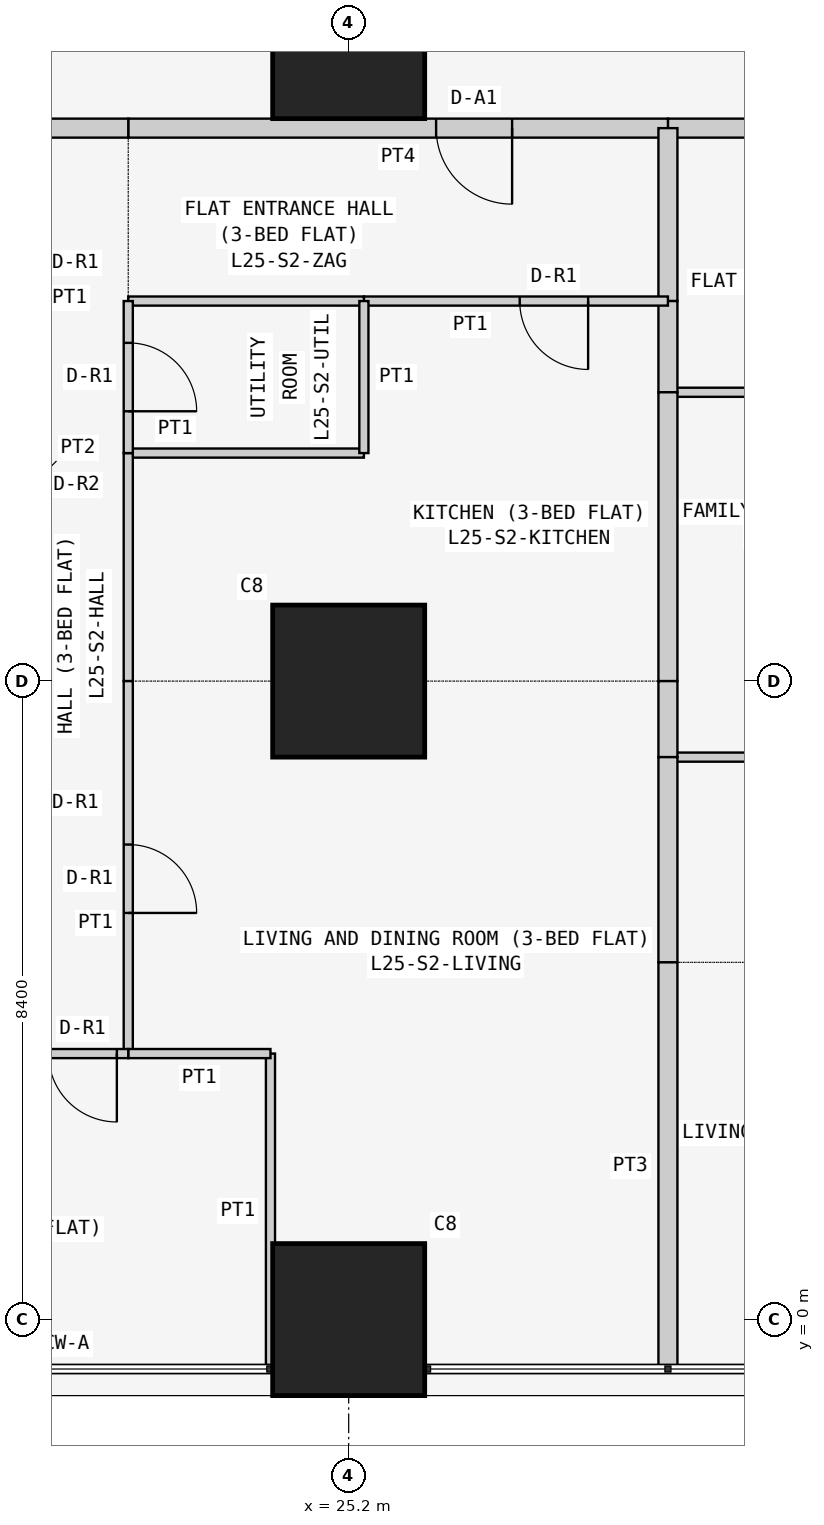
"""IFC4 building model, lengths in metres.
Left out: names, types, materials, properties, quantities, classifications, styles, units other than length and angle.
Written with IfcOpenShell. Run it as: python <this file> out.ifc"""

import sys

from ifc_helpers import new_model, si_unit, direction, frame, frame_2d, origin, origin_2d, place, context, subcontext, project, spatial, rectangle, extrude, element, fill, save


model = new_model("IFC4")
c1 = context("Model", 3, precision=1e-05, world=origin(), true_north=direction((0.0, 1.0)))
c2 = subcontext(c1, "Body", "Model", "MODEL_VIEW")
j1 = project(units=[si_unit("LENGTHUNIT", "METRE"), si_unit("PLANEANGLEUNIT", "RADIAN")], contexts=[c1])
p1 = place(None, origin())
s1 = spatial("IfcSite", under=j1, at=p1, CompositionType="ELEMENT")
p2 = place(p1, origin())
s2 = spatial("IfcBuilding", under=s1, at=p2, CompositionType="ELEMENT")
p3 = place(p2, frame((0.0, 0.0, 99.3)))
s3 = spatial("IfcBuildingStorey", under=s2, at=p3, CompositionType="ELEMENT", Elevation=99.3)
for number, where, z_axis, x_axis in (
    (1, (25.2, 0.0, 0.0), (0.0, 0.0, 1.0), (1.0, 0.0, 0.0)),
    (2, (25.2, 8.4, 0.0), (0.0, 0.0, 1.0), (1.0, 0.0, 0.0)),
    (3, (25.2, 16.8, 0.0), (0.0, 0.0, 1.0), (1.0, 0.0, 0.0)),
):
    element("IfcColumn", number, at=place(p3, frame(where, z_axis=z_axis, x_axis=x_axis)), inside=s3, PredefinedType="COLUMN", context=c2, shape_type="SweptSolid", body=[
        extrude(rectangle(XDim=2.0, YDim=2.0, at=origin_2d()), origin(), (0.0, 0.0, 1.0), 3.6),
    ])
p4 = place(p3, frame((34.629, 15.675, 0.0), z_axis=(0.0, 0.0, 1.0), x_axis=(-1.0, 0.0, 0.0)))
e4 = element("IfcWall", 4, at=p4, inside=s3, PredefinedType="PARTITIONING", context=c2, shape_type="SweptSolid", body=[
    extrude(rectangle(XDim=5.229, YDim=0.25, at=frame_2d((2.615, 0.0))), origin(), (0.0, 0.0, 1.0), 3.35),
])
p5 = place(p4, frame((2.229, 0.0, 0.0)))
e5 = element("IfcOpeningElement", 5, at=p5, cuts=e4, PredefinedType="OPENING", context=c2, shape_type="SweptSolid", body=[
    extrude(rectangle(XDim=1.0, YDim=2.1, at=frame_2d((0.5, 1.05))), frame((0.0, 0.135, 0.0), z_axis=(0.0, -1.0, 0.0), x_axis=(1.0, 0.0, 0.0)), (0.0, 0.0, 1.0), 0.27),
])
p6 = place(p3, frame((29.4, 15.675, 0.0), z_axis=(0.0, 0.0, 1.0), x_axis=(-1.0, 0.0, 0.0)))
e6 = element("IfcWall", 6, at=p6, inside=s3, PredefinedType="PARTITIONING", context=c2, shape_type="SweptSolid", body=[
    extrude(rectangle(XDim=7.1, YDim=0.25, at=frame_2d((3.55, 0.0))), origin(), (0.0, 0.0, 1.0), 3.35),
])
p7 = place(p6, frame((2.05, 0.0, 0.0)))
e7 = element("IfcOpeningElement", 7, at=p7, cuts=e6, PredefinedType="OPENING", context=c2, shape_type="SweptSolid", body=[
    extrude(rectangle(XDim=1.0, YDim=2.1, at=frame_2d((0.5, 1.05))), frame((0.0, 0.135, 0.0), z_axis=(0.0, -1.0, 0.0), x_axis=(1.0, 0.0, 0.0)), (0.0, 0.0, 1.0), 0.27),
])
p8 = place(p3, frame((22.3, 15.675, 0.0), z_axis=(0.0, 0.0, 1.0), x_axis=(-1.0, 0.0, 0.0)))
e8 = element("IfcWall", 8, at=p8, inside=s3, PredefinedType="PARTITIONING", context=c2, shape_type="SweptSolid", body=[
    extrude(rectangle(XDim=1.2, YDim=0.25, at=frame_2d((0.6, 0.0))), origin(), (0.0, 0.0, 1.0), 3.35),
])
p9 = place(p3, frame((29.4, 12.2, 0.0), z_axis=(0.0, 0.0, 1.0), x_axis=(1.0, 0.0, 0.0)))
e9 = element("IfcWall", 9, at=p9, inside=s3, PredefinedType="PARTITIONING", context=c2, shape_type="SweptSolid", body=[
    extrude(rectangle(XDim=5.229, YDim=0.12, at=frame_2d((2.615, 0.0))), origin(), (0.0, 0.0, 1.0), 3.35),
])
p10 = place(p3, frame((29.4, 15.675, 0.0), z_axis=(0.0, 0.0, 1.0), x_axis=(0.0, -1.0, 0.0)))
e10 = element("IfcWall", 10, at=p10, inside=s3, PredefinedType="PARTITIONING", context=c2, shape_type="SweptSolid", body=[
    extrude(rectangle(XDim=2.275, YDim=0.25, at=frame_2d((1.138, 0.0))), origin(), (0.0, 0.0, 1.0), 2.667),
])
p11 = place(p3, frame((29.4, 13.4, 0.0), z_axis=(0.0, 0.0, 1.0), x_axis=(0.0, -1.0, 0.0)))
e11 = element("IfcWall", 11, at=p11, inside=s3, PredefinedType="PARTITIONING", context=c2, shape_type="SweptSolid", body=[
    extrude(rectangle(XDim=1.2, YDim=0.25, at=frame_2d((0.6, 0.0))), origin(), (0.0, 0.0, 1.0), 2.667),
])
p12 = place(p3, frame((29.4, 7.4, 0.0), z_axis=(0.0, 0.0, 1.0), x_axis=(1.0, 0.0, 0.0)))
e12 = element("IfcWall", 12, at=p12, inside=s3, PredefinedType="PARTITIONING", context=c2, shape_type="SweptSolid", body=[
    extrude(rectangle(XDim=5.229, YDim=0.12, at=frame_2d((2.615, 0.0))), origin(), (0.0, 0.0, 1.0), 3.35),
])
p13 = place(p3, frame((29.4, 12.2, 0.0), z_axis=(0.0, 0.0, 1.0), x_axis=(0.0, -1.0, 0.0)))
e13 = element("IfcWall", 13, at=p13, inside=s3, PredefinedType="PARTITIONING", context=c2, shape_type="SweptSolid", body=[
    extrude(rectangle(XDim=3.8, YDim=0.25, at=frame_2d((1.9, 0.0))), origin(), (0.0, 0.0, 1.0), 2.667),
])
p14 = place(p3, frame((29.4, 8.4, 0.0), z_axis=(0.0, 0.0, 1.0), x_axis=(0.0, -1.0, 0.0)))
e14 = element("IfcWall", 14, at=p14, inside=s3, PredefinedType="PARTITIONING", context=c2, shape_type="SweptSolid", body=[
    extrude(rectangle(XDim=1.0, YDim=0.25, at=frame_2d((0.5, 0.0))), origin(), (0.0, 0.0, 1.0), 2.667),
])
p15 = place(p3, frame((29.4, 7.4, 0.0), z_axis=(0.0, 0.0, 1.0), x_axis=(0.0, -1.0, 0.0)))
e15 = element("IfcWall", 15, at=p15, inside=s3, PredefinedType="PARTITIONING", context=c2, shape_type="SweptSolid", body=[
    extrude(rectangle(XDim=2.7, YDim=0.25, at=frame_2d((1.35, 0.0))), origin(), (0.0, 0.0, 1.0), 2.667),
])
p16 = place(p3, frame((29.4, 4.7, 0.0), z_axis=(0.0, 0.0, 1.0), x_axis=(0.0, -1.0, 0.0)))
e16 = element("IfcWall", 16, at=p16, inside=s3, PredefinedType="PARTITIONING", context=c2, shape_type="SweptSolid", body=[
    extrude(rectangle(XDim=5.35, YDim=0.25, at=frame_2d((2.675, 0.0))), origin(), (0.0, 0.0, 1.0), 2.667),
])
p17 = place(p3, frame((29.4, 13.4, 0.0), z_axis=(0.0, 0.0, 1.0), x_axis=(-1.0, 0.0, 0.0)))
e17 = element("IfcWall", 17, at=p17, inside=s3, PredefinedType="PARTITIONING", context=c2, shape_type="SweptSolid", body=[
    extrude(rectangle(XDim=4.0, YDim=0.12, at=frame_2d((2.0, 0.0))), origin(), (0.0, 0.0, 1.0), 3.35),
])
p18 = place(p17, frame((1.05, 0.0, 0.0)))
e18 = element("IfcOpeningElement", 18, at=p18, cuts=e17, PredefinedType="OPENING", context=c2, shape_type="SweptSolid", body=[
    extrude(rectangle(XDim=0.9, YDim=2.1, at=frame_2d((0.45, 1.05))), frame((0.0, 0.07, 0.0), z_axis=(0.0, -1.0, 0.0), x_axis=(1.0, 0.0, 0.0)), (0.0, 0.0, 1.0), 0.14),
])
for number, where, z_axis, x_axis in (
    (19, (25.4, 13.4, 0.0), (0.0, 0.0, 1.0), (-1.0, 0.0, 0.0)),
    (20, (22.3, 11.4, 0.0), (0.0, 0.0, 1.0), (1.0, 0.0, 0.0)),
):
    element("IfcWall", number, at=place(p3, frame(where, z_axis=z_axis, x_axis=x_axis)), inside=s3, PredefinedType="PARTITIONING", context=c2, shape_type="SweptSolid", body=[
        extrude(rectangle(XDim=3.1, YDim=0.12, at=frame_2d((1.55, 0.0))), origin(), (0.0, 0.0, 1.0), 3.35),
    ])
p19 = place(p3, frame((25.4, 11.4, 0.0), z_axis=(0.0, 0.0, 1.0), x_axis=(0.0, 1.0, 0.0)))
e21 = element("IfcWall", 21, at=p19, inside=s3, PredefinedType="PARTITIONING", context=c2, shape_type="SweptSolid", body=[
    extrude(rectangle(XDim=2.0, YDim=0.12, at=frame_2d((1.0, 0.0))), origin(), (0.0, 0.0, 1.0), 3.35),
])
p20 = place(p3, frame((22.3, 8.4, 0.0), z_axis=(0.0, 0.0, 1.0), x_axis=(0.0, 1.0, 0.0)))
e22 = element("IfcWall", 22, at=p20, inside=s3, PredefinedType="PARTITIONING", context=c2, shape_type="SweptSolid", body=[
    extrude(rectangle(XDim=3.0, YDim=0.12, at=frame_2d((1.5, 0.0))), origin(), (0.0, 0.0, 1.0), 3.35),
])
p21 = place(p3, frame((22.3, 11.4, 0.0), z_axis=(0.0, 0.0, 1.0), x_axis=(0.0, 1.0, 0.0)))
e23 = element("IfcWall", 23, at=p21, inside=s3, PredefinedType="PARTITIONING", context=c2, shape_type="SweptSolid", body=[
    extrude(rectangle(XDim=2.0, YDim=0.12, at=frame_2d((1.0, 0.0))), origin(), (0.0, 0.0, 1.0), 3.35),
])
p22 = place(p21, frame((0.55, 0.0, 0.0)))
e24 = element("IfcOpeningElement", 24, at=p22, cuts=e23, PredefinedType="OPENING", context=c2, shape_type="SweptSolid", body=[
    extrude(rectangle(XDim=0.9, YDim=2.1, at=frame_2d((0.45, 1.05))), frame((0.0, 0.07, 0.0), z_axis=(0.0, -1.0, 0.0), x_axis=(1.0, 0.0, 0.0)), (0.0, 0.0, 1.0), 0.14),
])
p23 = place(p3, frame((22.3, 3.5, 0.0), z_axis=(0.0, 0.0, 1.0), x_axis=(0.0, 1.0, 0.0)))
e25 = element("IfcWall", 25, at=p23, inside=s3, PredefinedType="PARTITIONING", context=c2, shape_type="SweptSolid", body=[
    extrude(rectangle(XDim=4.9, YDim=0.12, at=frame_2d((2.45, 0.0))), origin(), (0.0, 0.0, 1.0), 3.35),
])
p24 = place(p23, frame((1.85, 0.0, 0.0)))
e26 = element("IfcOpeningElement", 26, at=p24, cuts=e25, PredefinedType="OPENING", context=c2, shape_type="SweptSolid", body=[
    extrude(rectangle(XDim=0.9, YDim=2.1, at=frame_2d((0.45, 1.05))), frame((0.0, 0.07, 0.0), z_axis=(0.0, -1.0, 0.0), x_axis=(1.0, 0.0, 0.0)), (0.0, 0.0, 1.0), 0.14),
])
p25 = place(p3, frame((24.171, -0.65, 0.0), z_axis=(0.0, 0.0, 1.0), x_axis=(0.0, 1.0, 0.0)))
e27 = element("IfcWall", 27, at=p25, inside=s3, PredefinedType="PARTITIONING", context=c2, shape_type="SweptSolid", body=[
    extrude(rectangle(XDim=4.15, YDim=0.12, at=frame_2d((2.075, 0.0))), origin(), (0.0, 0.0, 1.0), 3.35),
])
p26 = place(p3, frame((24.171, 3.5, 0.0), z_axis=(0.0, 0.0, 1.0), x_axis=(-1.0, 0.0, 0.0)))
e28 = element("IfcWall", 28, at=p26, inside=s3, PredefinedType="PARTITIONING", context=c2, shape_type="SweptSolid", body=[
    extrude(rectangle(XDim=1.871, YDim=0.12, at=frame_2d((0.936, 0.0))), origin(), (0.0, 0.0, 1.0), 3.35),
])
p27 = place(p3, frame((22.3, 3.5, 0.0), z_axis=(0.0, 0.0, 1.0), x_axis=(-1.0, 0.0, 0.0)))
e29 = element("IfcWall", 29, at=p27, inside=s3, PredefinedType="PARTITIONING", context=c2, shape_type="SweptSolid", body=[
    extrude(rectangle(XDim=1.2, YDim=0.12, at=frame_2d((0.6, 0.0))), origin(), (0.0, 0.0, 1.0), 3.35),
])
p28 = place(p27, frame((0.15, 0.0, 0.0)))
e30 = element("IfcOpeningElement", 30, at=p28, cuts=e29, PredefinedType="OPENING", context=c2, shape_type="SweptSolid", body=[
    extrude(rectangle(XDim=0.9, YDim=2.1, at=frame_2d((0.45, 1.05))), frame((0.0, 0.07, 0.0), z_axis=(0.0, -1.0, 0.0), x_axis=(1.0, 0.0, 0.0)), (0.0, 0.0, 1.0), 0.14),
])
p29 = place(p7, origin())
e31 = element("IfcDoor", 31, at=p29, inside=s3, OperationType="SINGLE_SWING_LEFT", PredefinedType="DOOR", context=c2, shape_type="SweptSolid", body=[
    extrude(rectangle(XDim=1.0, YDim=2.1, at=frame_2d((0.5, 1.05))), frame((0.0, 0.025, 0.0), z_axis=(0.0, -1.0, 0.0), x_axis=(1.0, 0.0, 0.0)), (0.0, 0.0, 1.0), 0.05),
])
fill(e7, e31)
p30 = place(p18, origin())
e32 = element("IfcDoor", 32, at=p30, inside=s3, OperationType="SINGLE_SWING_LEFT", PredefinedType="DOOR", context=c2, shape_type="SweptSolid", body=[
    extrude(rectangle(XDim=0.9, YDim=2.1, at=frame_2d((0.45, 1.05))), frame((0.0, 0.025, 0.0), z_axis=(0.0, -1.0, 0.0), x_axis=(1.0, 0.0, 0.0)), (0.0, 0.0, 1.0), 0.05),
])
fill(e18, e32)
p31 = place(p22, frame((0.9, 0.0, 0.0), z_axis=(0.0, 0.0, 1.0), x_axis=(-1.0, 0.0, 0.0)))
e33 = element("IfcDoor", 33, at=p31, inside=s3, OperationType="SINGLE_SWING_RIGHT", PredefinedType="DOOR", context=c2, shape_type="SweptSolid", body=[
    extrude(rectangle(XDim=0.9, YDim=2.1, at=frame_2d((0.45, 1.05))), frame((0.0, 0.025, 0.0), z_axis=(0.0, -1.0, 0.0), x_axis=(1.0, 0.0, 0.0)), (0.0, 0.0, 1.0), 0.05),
])
fill(e24, e33)
p32 = place(p24, frame((0.9, 0.0, 0.0), z_axis=(0.0, 0.0, 1.0), x_axis=(-1.0, 0.0, 0.0)))
e34 = element("IfcDoor", 34, at=p32, inside=s3, OperationType="SINGLE_SWING_RIGHT", PredefinedType="DOOR", context=c2, shape_type="SweptSolid", body=[
    extrude(rectangle(XDim=0.9, YDim=2.1, at=frame_2d((0.45, 1.05))), frame((0.0, 0.025, 0.0), z_axis=(0.0, -1.0, 0.0), x_axis=(1.0, 0.0, 0.0)), (0.0, 0.0, 1.0), 0.05),
])
fill(e26, e34)
p33 = place(p28, origin())
e35 = element("IfcDoor", 35, at=p33, inside=s3, OperationType="SINGLE_SWING_LEFT", PredefinedType="DOOR", context=c2, shape_type="SweptSolid", body=[
    extrude(rectangle(XDim=0.9, YDim=2.1, at=frame_2d((0.45, 1.05))), frame((0.0, 0.025, 0.0), z_axis=(0.0, -1.0, 0.0), x_axis=(1.0, 0.0, 0.0)), (0.0, 0.0, 1.0), 0.05),
])
fill(e30, e35)
save(model, sys.argv[1])
